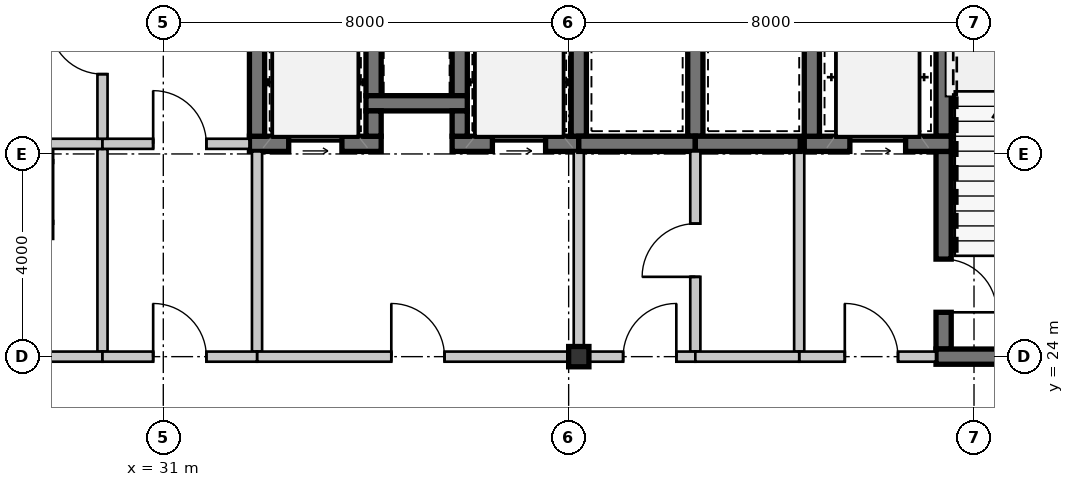
"""IFC4 building model, lengths in metres.
Left out: names, types, materials, properties, quantities, classifications, styles, units other than length and angle.
Written with IfcOpenShell. Run it as: python <this file> out.ifc"""

import sys

from ifc_helpers import new_model, si_unit, direction, frame, frame_2d, origin, origin_2d, place, context, subcontext, project, spatial, rectangle, hollow_rectangle, extrude, source, transform, mapped, element, fill, save


model = new_model("IFC4")
c1 = context("Model", 3, precision=1e-05, world=origin(), true_north=direction((0.0, 1.0)))
c2 = subcontext(c1, "Body", "Model", "MODEL_VIEW")
j1 = project(units=[si_unit("LENGTHUNIT", "METRE"), si_unit("PLANEANGLEUNIT", "RADIAN")], contexts=[c1])
p1 = place(None, origin())
s1 = spatial("IfcSite", under=j1, at=p1, CompositionType="ELEMENT")
p2 = place(p1, origin())
s2 = spatial("IfcBuilding", under=s1, at=p2, CompositionType="ELEMENT")
p3 = place(p2, frame((0.0, 0.0, 120.4)))
s3 = spatial("IfcBuildingStorey", under=s2, at=p3, CompositionType="ELEMENT", Elevation=120.4)
m1 = source(origin(), c2, "Body", "SweptSolid", [
    extrude(hollow_rectangle(XDim=0.4, YDim=0.4, WallThickness=0.016, at=origin_2d()), origin(), (0.0, 0.0, 1.0), 3.15),
])
p4 = place(p3, frame((39.2, 24.0, 0.0), z_axis=(0.0, 0.0, 1.0), x_axis=(1.0, 0.0, 0.0)))
e1 = element("IfcColumn", 1, at=p4, inside=s3, PredefinedType="COLUMN", context=c2, shape_type="MappedRepresentation", body=[
    mapped(m1, transform((0.0, 0.0, 0.0), scale=1.0)),
])
m2 = source(origin(), c2, "Body", "SweptSolid", [
    extrude(rectangle(XDim=3.5, YDim=0.3, at=frame_2d((1.75, 0.0))), origin(), (0.0, 0.0, 1.0), 2.93),
])
p5 = place(p3, frame((46.4, 31.85, 0.0), z_axis=(0.0, 0.0, 1.0), x_axis=(0.0, -1.0, 0.0)))
e2 = element("IfcWall", 2, at=p5, inside=s3, PredefinedType="SHEAR", context=c2, shape_type="MappedRepresentation", body=[
    mapped(m2, transform((0.0, 0.0, 0.0), scale=1.0)),
])
m3 = source(origin(), c2, "Body", "SweptSolid", [
    extrude(rectangle(XDim=3.9, YDim=0.3, at=frame_2d((1.95, 0.0))), origin(), (0.0, 0.0, 1.0), 2.93),
])
p6 = place(p3, frame((46.4, 28.05, 0.0), z_axis=(0.0, 0.0, 1.0), x_axis=(0.0, -1.0, 0.0)))
e3 = element("IfcWall", 3, at=p6, inside=s3, PredefinedType="SHEAR", context=c2, shape_type="MappedRepresentation", body=[
    mapped(m3, transform((0.0, 0.0, 0.0), scale=1.0)),
])
m4 = source(origin(), c2, "Body", "SweptSolid", [
    extrude(rectangle(XDim=1.05, YDim=2.1, at=frame_2d((0.525, 1.05))), frame((0.0, 0.16, 0.0), z_axis=(0.0, -1.0, 0.0), x_axis=(1.0, 0.0, 0.0)), (0.0, 0.0, 1.0), 0.32),
])
p7 = place(p6, frame((2.125, 0.0, 0.0)))
e4 = element("IfcOpeningElement", 4, at=p7, cuts=e3, PredefinedType="OPENING", context=c2, shape_type="MappedRepresentation", body=[
    mapped(m4, transform((0.0, 0.0, 0.0), scale=1.0)),
])
m5 = source(origin(), c2, "Body", "SweptSolid", [
    extrude(rectangle(XDim=4.9, YDim=0.3, at=frame_2d((2.45, 0.0))), origin(), (0.0, 0.0, 1.0), 2.93),
])
p8 = place(p3, frame((46.25, 24.0, 0.0), z_axis=(0.0, 0.0, 1.0), x_axis=(1.0, 0.0, 0.0)))
e5 = element("IfcWall", 5, at=p8, inside=s3, PredefinedType="SHEAR", context=c2, shape_type="MappedRepresentation", body=[
    mapped(m5, transform((0.0, 0.0, 0.0), scale=1.0)),
])
m6 = source(origin(), c2, "Body", "SweptSolid", [
    extrude(rectangle(XDim=2.9, YDim=0.3, at=frame_2d((1.45, 0.0))), origin(), (0.0, 0.0, 1.0), 2.93),
])
p9 = place(p3, frame((43.65, 28.2, 0.0), z_axis=(0.0, 0.0, 1.0), x_axis=(1.0, 0.0, 0.0)))
e6 = element("IfcWall", 6, at=p9, inside=s3, PredefinedType="SHEAR", context=c2, shape_type="MappedRepresentation", body=[
    mapped(m6, transform((0.0, 0.0, 0.0), scale=1.0)),
])
m7 = source(origin(), c2, "Body", "SweptSolid", [
    extrude(rectangle(XDim=1.1, YDim=2.15, at=frame_2d((0.55, 1.075))), frame((0.0, 0.16, 0.0), z_axis=(0.0, -1.0, 0.0), x_axis=(1.0, 0.0, 0.0)), (0.0, 0.0, 1.0), 0.32),
])
p10 = place(p9, frame((0.9, 0.0, 0.0)))
e7 = element("IfcOpeningElement", 7, at=p10, cuts=e6, PredefinedType="OPENING", context=c2, shape_type="MappedRepresentation", body=[
    mapped(m7, transform((0.0, 0.0, 0.0), scale=1.0)),
])
p11 = place(p3, frame((43.8, 31.85, 0.0), z_axis=(0.0, 0.0, 1.0), x_axis=(0.0, -1.0, 0.0)))
e8 = element("IfcWall", 8, at=p11, inside=s3, PredefinedType="SHEAR", context=c2, shape_type="MappedRepresentation", body=[
    mapped(m2, transform((0.0, 0.0, 0.0), scale=1.0)),
])
m8 = source(origin(), c2, "Body", "SweptSolid", [
    extrude(rectangle(XDim=3.95, YDim=0.2, at=frame_2d((1.975, 0.0))), origin(), (0.0, 0.0, 1.0), 2.93),
])
p12 = place(p3, frame((43.55, 28.05, 0.0), z_axis=(0.0, 0.0, 1.0), x_axis=(0.0, -1.0, 0.0)))
e9 = element("IfcWall", 9, at=p12, inside=s3, PredefinedType="SOLIDWALL", context=c2, shape_type="MappedRepresentation", body=[
    mapped(m8, transform((0.0, 0.0, 0.0), scale=1.0)),
])
m9 = source(origin(), c2, "Body", "SweptSolid", [
    extrude(rectangle(XDim=2.7, YDim=0.2, at=frame_2d((1.35, 0.0))), origin(), (0.0, 0.0, 1.0), 2.397),
])
p13 = place(p3, frame((43.55, 24.0, 0.0), z_axis=(0.0, 0.0, 1.0), x_axis=(1.0, 0.0, 0.0)))
e10 = element("IfcWall", 10, at=p13, inside=s3, PredefinedType="SOLIDWALL", context=c2, shape_type="MappedRepresentation", body=[
    mapped(m9, transform((0.0, 0.0, 0.0), scale=1.0)),
])
m10 = source(origin(), c2, "Body", "SweptSolid", [
    extrude(rectangle(XDim=1.05, YDim=2.1, at=frame_2d((0.525, 1.05))), frame((0.0, 0.11, 0.0), z_axis=(0.0, -1.0, 0.0), x_axis=(1.0, 0.0, 0.0)), (0.0, 0.0, 1.0), 0.22),
])
p14 = place(p13, frame((0.9, 0.0, 0.0)))
e11 = element("IfcOpeningElement", 11, at=p14, cuts=e10, PredefinedType="OPENING", context=c2, shape_type="MappedRepresentation", body=[
    mapped(m10, transform((0.0, 0.0, 0.0), scale=1.0)),
])
m11 = source(origin(), c2, "Body", "SweptSolid", [
    extrude(rectangle(XDim=1.2, YDim=0.3, at=frame_2d((0.6, 0.0))), origin(), (0.0, 0.0, 1.0), 2.93),
])
for number, where, z_axis, x_axis in (
    (12, (35.15, 30.35, 0.0), (0.0, 0.0, 1.0), (0.0, -1.0, 0.0)),
    (13, (36.85, 29.15, 0.0), (0.0, 0.0, 1.0), (0.0, 1.0, 0.0)),
):
    element("IfcWall", number, at=place(p3, frame(where, z_axis=z_axis, x_axis=x_axis)), inside=s3, PredefinedType="SHEAR", context=c2, shape_type="MappedRepresentation", body=[
        mapped(m11, transform((0.0, 0.0, 0.0), scale=1.0)),
    ])
m12 = source(origin(), c2, "Body", "SweptSolid", [
    extrude(rectangle(XDim=2.0, YDim=0.3, at=frame_2d((1.0, 0.0))), origin(), (0.0, 0.0, 1.0), 2.93),
])
p15 = place(p3, frame((35.0, 29.0, 0.0), z_axis=(0.0, 0.0, 1.0), x_axis=(1.0, 0.0, 0.0)))
e14 = element("IfcWall", 14, at=p15, inside=s3, PredefinedType="SHEAR", context=c2, shape_type="MappedRepresentation", body=[
    mapped(m12, transform((0.0, 0.0, 0.0), scale=1.0)),
])
m13 = source(origin(), c2, "Body", "SweptSolid", [
    extrude(rectangle(XDim=1.7, YDim=0.3, at=frame_2d((0.85, 0.0))), origin(), (0.0, 0.0, 1.0), 2.93),
])
p16 = place(p3, frame((27.1, 26.5, 0.0), z_axis=(0.0, 0.0, 1.0), x_axis=(1.0, 0.0, 0.0)))
e15 = element("IfcWall", 15, at=p16, inside=s3, PredefinedType="SHEAR", context=c2, shape_type="MappedRepresentation", body=[
    mapped(m13, transform((0.0, 0.0, 0.0), scale=1.0)),
])
m14 = source(origin(), c2, "Body", "SweptSolid", [
    extrude(rectangle(XDim=2.6, YDim=0.3, at=frame_2d((1.3, 0.0))), origin(), (0.0, 0.0, 1.0), 2.93),
])
p17 = place(p3, frame((32.7, 28.2, 0.0), z_axis=(0.0, 0.0, 1.0), x_axis=(1.0, 0.0, 0.0)))
e16 = element("IfcWall", 16, at=p17, inside=s3, PredefinedType="SHEAR", context=c2, shape_type="MappedRepresentation", body=[
    mapped(m14, transform((0.0, 0.0, 0.0), scale=1.0)),
])
m15 = source(origin(), c2, "Body", "SweptSolid", [
    extrude(rectangle(XDim=1.05, YDim=2.15, at=frame_2d((0.525, 1.075))), frame((0.0, 0.16, 0.0), z_axis=(0.0, -1.0, 0.0), x_axis=(1.0, 0.0, 0.0)), (0.0, 0.0, 1.0), 0.32),
])
p18 = place(p17, frame((0.775, 0.0, 0.0)))
e17 = element("IfcOpeningElement", 17, at=p18, cuts=e16, PredefinedType="OPENING", context=c2, shape_type="MappedRepresentation", body=[
    mapped(m15, transform((0.0, 0.0, 0.0), scale=1.0)),
])
m16 = source(origin(), c2, "Body", "SweptSolid", [
    extrude(rectangle(XDim=0.5, YDim=0.3, at=frame_2d((0.25, 0.0))), origin(), (0.0, 0.0, 1.0), 2.93),
])
p19 = place(p3, frame((35.15, 28.35, 0.0), z_axis=(0.0, 0.0, 1.0), x_axis=(0.0, 1.0, 0.0)))
e18 = element("IfcWall", 18, at=p19, inside=s3, PredefinedType="SHEAR", context=c2, shape_type="MappedRepresentation", body=[
    mapped(m16, transform((0.0, 0.0, 0.0), scale=1.0)),
])
p20 = place(p3, frame((32.85, 31.85, 0.0), z_axis=(0.0, 0.0, 1.0), x_axis=(0.0, -1.0, 0.0)))
e19 = element("IfcWall", 19, at=p20, inside=s3, PredefinedType="SHEAR", context=c2, shape_type="MappedRepresentation", body=[
    mapped(m2, transform((0.0, 0.0, 0.0), scale=1.0)),
])
m17 = source(origin(), c2, "Body", "SweptSolid", [
    extrude(rectangle(XDim=2.5, YDim=0.3, at=frame_2d((1.25, 0.0))), origin(), (0.0, 0.0, 1.0), 2.93),
])
p21 = place(p3, frame((36.7, 28.2, 0.0), z_axis=(0.0, 0.0, 1.0), x_axis=(1.0, 0.0, 0.0)))
e20 = element("IfcWall", 20, at=p21, inside=s3, PredefinedType="SHEAR", context=c2, shape_type="MappedRepresentation", body=[
    mapped(m17, transform((0.0, 0.0, 0.0), scale=1.0)),
])
p22 = place(p21, frame((0.795, 0.0, 0.0)))
e21 = element("IfcOpeningElement", 21, at=p22, cuts=e20, PredefinedType="OPENING", context=c2, shape_type="MappedRepresentation", body=[
    mapped(m15, transform((0.0, 0.0, 0.0), scale=1.0)),
])
p23 = place(p3, frame((36.85, 28.85, 0.0), z_axis=(0.0, 0.0, 1.0), x_axis=(0.0, -1.0, 0.0)))
e22 = element("IfcWall", 22, at=p23, inside=s3, PredefinedType="SHEAR", context=c2, shape_type="MappedRepresentation", body=[
    mapped(m16, transform((0.0, 0.0, 0.0), scale=1.0)),
])
p24 = place(p3, frame((39.2, 28.35, 0.0), z_axis=(0.0, 0.0, 1.0), x_axis=(0.0, 1.0, 0.0)))
e23 = element("IfcWall", 23, at=p24, inside=s3, PredefinedType="SHEAR", context=c2, shape_type="MappedRepresentation", body=[
    mapped(m2, transform((0.0, 0.0, 0.0), scale=1.0)),
])
p25 = place(p3, frame((32.85, 24.1, 0.0), z_axis=(0.0, 0.0, 1.0), x_axis=(0.0, 1.0, 0.0)))
e24 = element("IfcWall", 24, at=p25, inside=s3, PredefinedType="SOLIDWALL", context=c2, shape_type="MappedRepresentation", body=[
    mapped(m8, transform((0.0, 0.0, 0.0), scale=1.0)),
])
m18 = source(origin(), c2, "Body", "SweptSolid", [
    extrude(rectangle(XDim=3.95, YDim=0.2, at=frame_2d((1.975, 0.0))), origin(), (0.0, 0.0, 1.0), 2.47),
])
p26 = place(p3, frame((39.2, 28.05, 0.0), z_axis=(0.0, 0.0, 1.0), x_axis=(0.0, -1.0, 0.0)))
e25 = element("IfcWall", 25, at=p26, inside=s3, PredefinedType="SOLIDWALL", context=c2, shape_type="MappedRepresentation", body=[
    mapped(m18, transform((0.0, 0.0, 0.0), scale=1.0)),
])
m19 = source(origin(), c2, "Body", "SweptSolid", [
    extrude(rectangle(XDim=6.35, YDim=0.2, at=frame_2d((3.175, 0.0))), origin(), (0.0, 0.0, 1.0), 2.47),
])
p27 = place(p3, frame((39.2, 24.0, 0.0), z_axis=(0.0, 0.0, 1.0), x_axis=(-1.0, 0.0, 0.0)))
e26 = element("IfcWall", 26, at=p27, inside=s3, PredefinedType="SOLIDWALL", context=c2, shape_type="MappedRepresentation", body=[
    mapped(m19, transform((0.0, 0.0, 0.0), scale=1.0)),
])
p28 = place(p27, frame((2.65, 0.0, 0.0)))
e27 = element("IfcOpeningElement", 27, at=p28, cuts=e26, PredefinedType="OPENING", context=c2, shape_type="MappedRepresentation", body=[
    mapped(m10, transform((0.0, 0.0, 0.0), scale=1.0)),
])
p29 = place(p3, frame((41.5, 28.35, 0.0), z_axis=(0.0, 0.0, 1.0), x_axis=(0.0, 1.0, 0.0)))
e28 = element("IfcWall", 28, at=p29, inside=s3, PredefinedType="SHEAR", context=c2, shape_type="MappedRepresentation", body=[
    mapped(m2, transform((0.0, 0.0, 0.0), scale=1.0)),
])
m20 = source(origin(), c2, "Body", "SweptSolid", [
    extrude(rectangle(XDim=2.3, YDim=0.3, at=frame_2d((1.15, 0.0))), origin(), (0.0, 0.0, 1.0), 2.93),
])
p30 = place(p3, frame((39.2, 28.2, 0.0), z_axis=(0.0, 0.0, 1.0), x_axis=(1.0, 0.0, 0.0)))
e29 = element("IfcWall", 29, at=p30, inside=s3, PredefinedType="SHEAR", context=c2, shape_type="MappedRepresentation", body=[
    mapped(m20, transform((0.0, 0.0, 0.0), scale=1.0)),
])
m21 = source(origin(), c2, "Body", "SweptSolid", [
    extrude(rectangle(XDim=2.07, YDim=0.3, at=frame_2d((1.035, 0.0))), origin(), (0.0, 0.0, 1.0), 2.93),
])
p31 = place(p3, frame((41.5, 28.2, 0.0), z_axis=(0.0, 0.0, 1.0), x_axis=(1.0, 0.0, 0.0)))
e30 = element("IfcWall", 30, at=p31, inside=s3, PredefinedType="SHEAR", context=c2, shape_type="MappedRepresentation", body=[
    mapped(m21, transform((0.0, 0.0, 0.0), scale=1.0)),
])
m22 = source(origin(), c2, "Body", "SweptSolid", [
    extrude(rectangle(XDim=4.0, YDim=0.2, at=frame_2d((2.0, 0.0))), origin(), (0.0, 0.0, 1.0), 2.93),
])
p32 = place(p3, frame((29.8, 28.1, 0.0), z_axis=(0.0, 0.0, 1.0), x_axis=(0.0, -1.0, 0.0)))
e31 = element("IfcWall", 31, at=p32, inside=s3, PredefinedType="SOLIDWALL", context=c2, shape_type="MappedRepresentation", body=[
    mapped(m22, transform((0.0, 0.0, 0.0), scale=1.0)),
])
m23 = source(origin(), c2, "Body", "SweptSolid", [
    extrude(rectangle(XDim=3.35, YDim=0.2, at=frame_2d((1.675, 0.0))), origin(), (0.0, 0.0, 1.0), 2.93),
])
p33 = place(p3, frame((26.45, 28.2, 0.0), z_axis=(0.0, 0.0, 1.0), x_axis=(1.0, 0.0, 0.0)))
e32 = element("IfcWall", 32, at=p33, inside=s3, PredefinedType="SOLIDWALL", context=c2, shape_type="MappedRepresentation", body=[
    mapped(m23, transform((0.0, 0.0, 0.0), scale=1.0)),
])
m24 = source(origin(), c2, "Body", "SweptSolid", [
    extrude(rectangle(XDim=3.35, YDim=0.2, at=frame_2d((1.675, 0.0))), origin(), (0.0, 0.0, 1.0), 2.47),
])
p34 = place(p3, frame((29.8, 24.0, 0.0), z_axis=(0.0, 0.0, 1.0), x_axis=(-1.0, 0.0, 0.0)))
e33 = element("IfcWall", 33, at=p34, inside=s3, PredefinedType="SOLIDWALL", context=c2, shape_type="MappedRepresentation", body=[
    mapped(m24, transform((0.0, 0.0, 0.0), scale=1.0)),
])
m25 = source(origin(), c2, "Body", "SweptSolid", [
    extrude(rectangle(XDim=2.9, YDim=0.2, at=frame_2d((1.45, 0.0))), origin(), (0.0, 0.0, 1.0), 2.93),
])
p35 = place(p3, frame((29.8, 28.2, 0.0), z_axis=(0.0, 0.0, 1.0), x_axis=(1.0, 0.0, 0.0)))
e34 = element("IfcWall", 34, at=p35, inside=s3, PredefinedType="SOLIDWALL", context=c2, shape_type="MappedRepresentation", body=[
    mapped(m25, transform((0.0, 0.0, 0.0), scale=1.0)),
])
p36 = place(p35, frame((1.0, 0.0, 0.0)))
e35 = element("IfcOpeningElement", 35, at=p36, cuts=e34, PredefinedType="OPENING", context=c2, shape_type="MappedRepresentation", body=[
    mapped(m10, transform((0.0, 0.0, 0.0), scale=1.0)),
])
m26 = source(origin(), c2, "Body", "SweptSolid", [
    extrude(rectangle(XDim=3.05, YDim=0.2, at=frame_2d((1.525, 0.0))), origin(), (0.0, 0.0, 1.0), 2.47),
])
p37 = place(p3, frame((32.85, 24.0, 0.0), z_axis=(0.0, 0.0, 1.0), x_axis=(-1.0, 0.0, 0.0)))
e36 = element("IfcWall", 36, at=p37, inside=s3, PredefinedType="SOLIDWALL", context=c2, shape_type="MappedRepresentation", body=[
    mapped(m26, transform((0.0, 0.0, 0.0), scale=1.0)),
])
p38 = place(p37, frame((1.0, 0.0, 0.0)))
e37 = element("IfcOpeningElement", 37, at=p38, cuts=e36, PredefinedType="OPENING", context=c2, shape_type="MappedRepresentation", body=[
    mapped(m10, transform((0.0, 0.0, 0.0), scale=1.0)),
])
m27 = source(origin(), c2, "Body", "SweptSolid", [
    extrude(rectangle(XDim=3.55, YDim=0.2, at=frame_2d((1.775, 0.0))), origin(), (0.0, 0.0, 1.0), 2.93),
])
p39 = place(p3, frame((29.8, 31.85, 0.0), z_axis=(0.0, 0.0, 1.0), x_axis=(0.0, -1.0, 0.0)))
e38 = element("IfcWall", 38, at=p39, inside=s3, PredefinedType="SOLIDWALL", context=c2, shape_type="MappedRepresentation", body=[
    mapped(m27, transform((0.0, 0.0, 0.0), scale=1.0)),
])
p40 = place(p39, frame((1.225, 0.0, 0.0)))
e39 = element("IfcOpeningElement", 39, at=p40, cuts=e38, PredefinedType="OPENING", context=c2, shape_type="MappedRepresentation", body=[
    mapped(m10, transform((0.0, 0.0, 0.0), scale=1.0)),
])
p41 = place(p3, frame((41.5, 28.05, 0.0), z_axis=(0.0, 0.0, 1.0), x_axis=(0.0, -1.0, 0.0)))
e40 = element("IfcWall", 40, at=p41, inside=s3, PredefinedType="SOLIDWALL", context=c2, shape_type="MappedRepresentation", body=[
    mapped(m8, transform((0.0, 0.0, 0.0), scale=1.0)),
])
p42 = place(p41, frame((1.425, 0.0, 0.0)))
e41 = element("IfcOpeningElement", 41, at=p42, cuts=e40, PredefinedType="OPENING", context=c2, shape_type="MappedRepresentation", body=[
    mapped(m10, transform((0.0, 0.0, 0.0), scale=1.0)),
])
m28 = source(origin(), c2, "Body", "SweptSolid", [
    extrude(rectangle(XDim=2.3, YDim=0.2, at=frame_2d((1.15, 0.0))), origin(), (0.0, 0.0, 1.0), 2.397),
])
p43 = place(p3, frame((41.5, 24.0, 0.0), z_axis=(0.0, 0.0, 1.0), x_axis=(-1.0, 0.0, 0.0)))
e42 = element("IfcWall", 42, at=p43, inside=s3, PredefinedType="SOLIDWALL", context=c2, shape_type="MappedRepresentation", body=[
    mapped(m28, transform((0.0, 0.0, 0.0), scale=1.0)),
])
p44 = place(p43, frame((0.375, 0.0, 0.0)))
e43 = element("IfcOpeningElement", 43, at=p44, cuts=e42, PredefinedType="OPENING", context=c2, shape_type="MappedRepresentation", body=[
    mapped(m10, transform((0.0, 0.0, 0.0), scale=1.0)),
])
m29 = source(origin(), c2, "Body", "SweptSolid", [
    extrude(rectangle(XDim=2.05, YDim=0.2, at=frame_2d((1.025, 0.0))), origin(), (0.0, 0.0, 1.0), 2.397),
])
p45 = place(p3, frame((43.55, 24.0, 0.0), z_axis=(0.0, 0.0, 1.0), x_axis=(-1.0, 0.0, 0.0)))
e44 = element("IfcWall", 44, at=p45, inside=s3, PredefinedType="SOLIDWALL", context=c2, shape_type="MappedRepresentation", body=[
    mapped(m29, transform((0.0, 0.0, 0.0), scale=1.0)),
])
m30 = source(origin(), c2, "Body", "SweptSolid", [
    extrude(rectangle(XDim=1.05, YDim=2.1, at=frame_2d((0.525, 1.05))), frame((0.0, 0.025, 0.0), z_axis=(0.0, -1.0, 0.0), x_axis=(1.0, 0.0, 0.0)), (0.0, 0.0, 1.0), 0.05),
])
p46 = place(p7, origin())
e45 = element("IfcDoor", 45, at=p46, inside=s3, OperationType="SINGLE_SWING_RIGHT", PredefinedType="DOOR", context=c2, shape_type="MappedRepresentation", body=[
    mapped(m30, transform((0.0, 0.0, 0.0), scale=1.0)),
])
fill(e4, e45)
m31 = source(origin(), c2, "Body", "SweptSolid", [
    extrude(rectangle(XDim=1.1, YDim=2.15, at=frame_2d((0.55, 1.075))), frame((0.0, 0.025, 0.0), z_axis=(0.0, -1.0, 0.0), x_axis=(1.0, 0.0, 0.0)), (0.0, 0.0, 1.0), 0.05),
])
p47 = place(p10, origin())
e46 = element("IfcDoor", 46, at=p47, inside=s3, OperationType="SLIDING_TO_LEFT", PredefinedType="DOOR", context=c2, shape_type="MappedRepresentation", body=[
    mapped(m31, transform((0.0, 0.0, 0.0), scale=1.0)),
])
fill(e7, e46)
p48 = place(p14, origin())
e47 = element("IfcDoor", 47, at=p48, inside=s3, OperationType="SINGLE_SWING_LEFT", PredefinedType="DOOR", context=c2, shape_type="MappedRepresentation", body=[
    mapped(m30, transform((0.0, 0.0, 0.0), scale=1.0)),
])
fill(e11, e47)
m32 = source(origin(), c2, "Body", "SweptSolid", [
    extrude(rectangle(XDim=1.05, YDim=2.15, at=frame_2d((0.525, 1.075))), frame((0.0, 0.025, 0.0), z_axis=(0.0, -1.0, 0.0), x_axis=(1.0, 0.0, 0.0)), (0.0, 0.0, 1.0), 0.05),
])
p49 = place(p18, origin())
e48 = element("IfcDoor", 48, at=p49, inside=s3, OperationType="SLIDING_TO_LEFT", PredefinedType="DOOR", context=c2, shape_type="MappedRepresentation", body=[
    mapped(m32, transform((0.0, 0.0, 0.0), scale=1.0)),
])
fill(e17, e48)
p50 = place(p22, origin())
e49 = element("IfcDoor", 49, at=p50, inside=s3, OperationType="SLIDING_TO_LEFT", PredefinedType="DOOR", context=c2, shape_type="MappedRepresentation", body=[
    mapped(m32, transform((0.0, 0.0, 0.0), scale=1.0)),
])
fill(e21, e49)
p51 = place(p28, frame((1.05, 0.0, 0.0), z_axis=(0.0, 0.0, 1.0), x_axis=(-1.0, 0.0, 0.0)))
e50 = element("IfcDoor", 50, at=p51, inside=s3, OperationType="SINGLE_SWING_LEFT", PredefinedType="DOOR", context=c2, shape_type="MappedRepresentation", body=[
    mapped(m30, transform((0.0, 0.0, 0.0), scale=1.0)),
])
fill(e27, e50)
p52 = place(p36, origin())
e51 = element("IfcDoor", 51, at=p52, inside=s3, OperationType="SINGLE_SWING_LEFT", PredefinedType="DOOR", context=c2, shape_type="MappedRepresentation", body=[
    mapped(m30, transform((0.0, 0.0, 0.0), scale=1.0)),
])
fill(e35, e51)
p53 = place(p38, frame((1.05, 0.0, 0.0), z_axis=(0.0, 0.0, 1.0), x_axis=(-1.0, 0.0, 0.0)))
e52 = element("IfcDoor", 52, at=p53, inside=s3, OperationType="SINGLE_SWING_LEFT", PredefinedType="DOOR", context=c2, shape_type="MappedRepresentation", body=[
    mapped(m30, transform((0.0, 0.0, 0.0), scale=1.0)),
])
fill(e37, e52)
p54 = place(p40, frame((1.05, 0.0, 0.0), z_axis=(0.0, 0.0, 1.0), x_axis=(-1.0, 0.0, 0.0)))
e53 = element("IfcDoor", 53, at=p54, inside=s3, OperationType="SINGLE_SWING_RIGHT", PredefinedType="DOOR", context=c2, shape_type="MappedRepresentation", body=[
    mapped(m30, transform((0.0, 0.0, 0.0), scale=1.0)),
])
fill(e39, e53)
p55 = place(p42, frame((1.05, 0.0, 0.0), z_axis=(0.0, 0.0, 1.0), x_axis=(-1.0, 0.0, 0.0)))
e54 = element("IfcDoor", 54, at=p55, inside=s3, OperationType="SINGLE_SWING_LEFT", PredefinedType="DOOR", context=c2, shape_type="MappedRepresentation", body=[
    mapped(m30, transform((0.0, 0.0, 0.0), scale=1.0)),
])
fill(e41, e54)
p56 = place(p44, frame((1.05, 0.0, 0.0), z_axis=(0.0, 0.0, 1.0), x_axis=(-1.0, 0.0, 0.0)))
e55 = element("IfcDoor", 55, at=p56, inside=s3, OperationType="SINGLE_SWING_RIGHT", PredefinedType="DOOR", context=c2, shape_type="MappedRepresentation", body=[
    mapped(m30, transform((0.0, 0.0, 0.0), scale=1.0)),
])
fill(e43, e55)
save(model, sys.argv[1])
